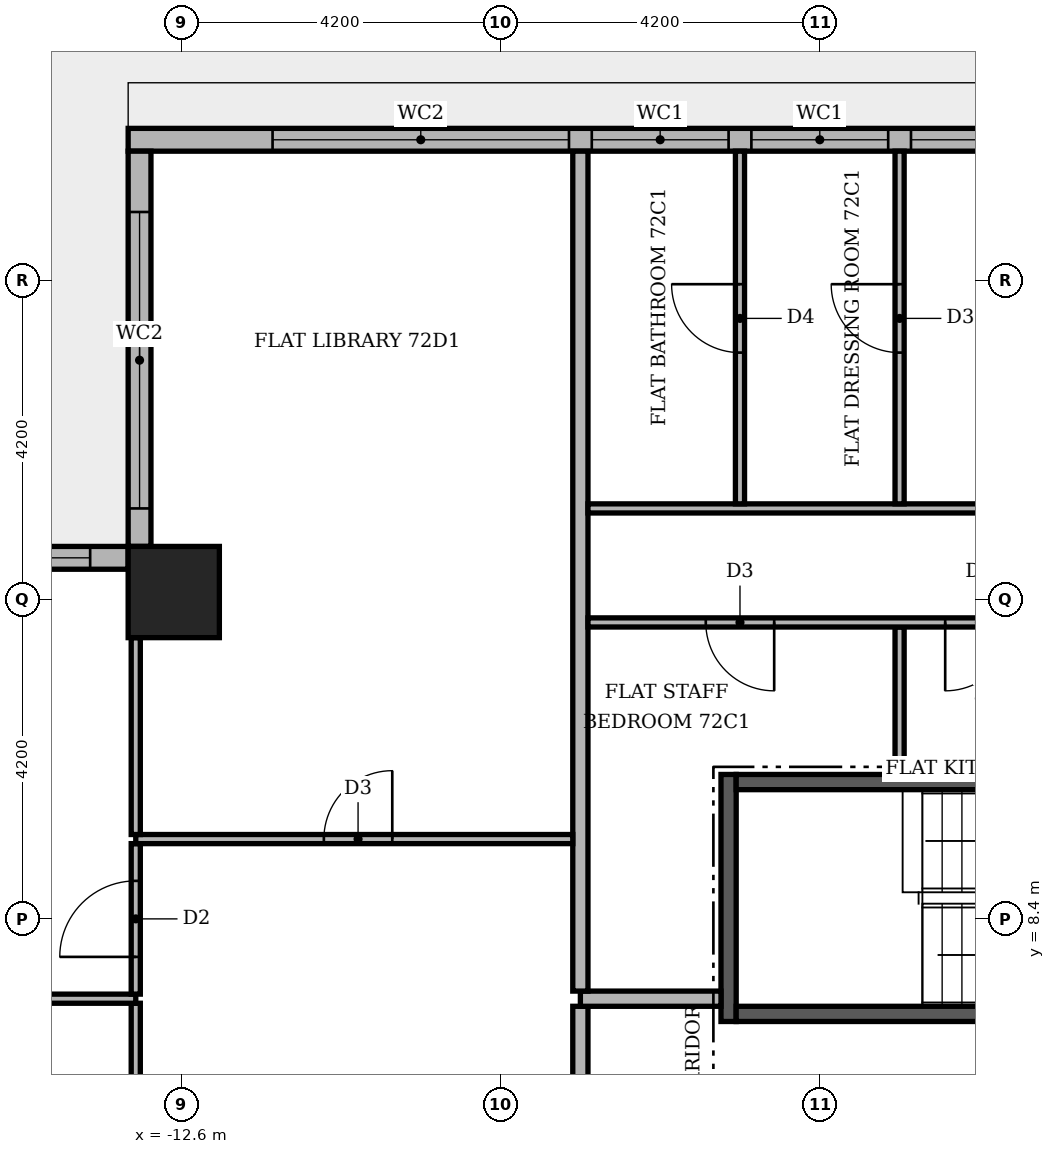
"""IFC4 building model, lengths in metres.
Left out: names, types, materials, properties, quantities, classifications, styles, units other than length and angle.
Written with IfcOpenShell. Run it as: python <this file> out.ifc"""

import sys

from ifc_helpers import new_model, si_unit, direction, frame, frame_2d, origin, origin_2d, place, context, subcontext, project, spatial, rectangle, extrude, element, fill, save


model = new_model("IFC4")
c1 = context("Model", 3, precision=1e-05, world=origin(), true_north=direction((0.0, 1.0)))
c2 = subcontext(c1, "Body", "Model", "MODEL_VIEW")
j1 = project(units=[si_unit("LENGTHUNIT", "METRE"), si_unit("PLANEANGLEUNIT", "RADIAN")], contexts=[c1])
p1 = place(None, origin())
s1 = spatial("IfcSite", under=j1, at=p1, CompositionType="ELEMENT")
p2 = place(p1, origin())
s2 = spatial("IfcBuilding", under=s1, at=p2, CompositionType="ELEMENT")
p3 = place(p2, frame((0.0, 0.0, 300.6)))
s3 = spatial("IfcBuildingStorey", under=s2, at=p3, CompositionType="ELEMENT", Elevation=300.6)
p4 = place(p3, frame((-5.4, 7.05, 0.0), z_axis=(0.0, 0.0, 1.0), x_axis=(0.0, 1.0, 0.0)))
e1 = element("IfcWall", 1, at=p4, inside=s3, PredefinedType="SHEAR", context=c2, shape_type="SweptSolid", body=[
    extrude(rectangle(XDim=3.25, YDim=0.2, at=frame_2d((1.625, 0.0))), origin(), (0.0, 0.0, 1.0), 3.55),
])
p5 = place(p3, frame((-5.3, 7.15, 0.0), z_axis=(0.0, 0.0, 1.0), x_axis=(1.0, 0.0, 0.0)))
e2 = element("IfcWall", 2, at=p5, inside=s3, PredefinedType="SHEAR", context=c2, shape_type="SweptSolid", body=[
    extrude(rectangle(XDim=6.4, YDim=0.2, at=frame_2d((3.2, 0.0))), origin(), (0.0, 0.0, 1.0), 3.55),
])
p6 = place(p5, frame((5.25, 0.0, 0.0)))
e3 = element("IfcOpeningElement", 3, at=p6, cuts=e2, PredefinedType="OPENING", context=c2, shape_type="SweptSolid", body=[
    extrude(rectangle(XDim=1.0, YDim=2.1, at=frame_2d((0.5, 1.05))), frame((0.0, 0.11, 0.0), z_axis=(0.0, -1.0, 0.0), x_axis=(1.0, 0.0, 0.0)), (0.0, 0.0, 1.0), 0.22),
])
p7 = place(p3, frame((-5.3, 10.2, 0.0), z_axis=(0.0, 0.0, 1.0), x_axis=(1.0, 0.0, 0.0)))
e4 = element("IfcWall", 4, at=p7, inside=s3, PredefinedType="SHEAR", context=c2, shape_type="SweptSolid", body=[
    extrude(rectangle(XDim=6.4, YDim=0.2, at=frame_2d((3.2, 0.0))), origin(), (0.0, 0.0, 1.0), 3.55),
])
p8 = place(p3, frame((-12.7, 12.7, -0.35), z_axis=(0.0, 0.0, 1.0), x_axis=(1.0, 0.0, 0.0)))
e5 = element("IfcColumn", 5, at=p8, inside=s3, PredefinedType="COLUMN", context=c2, shape_type="SweptSolid", body=[
    extrude(rectangle(XDim=1.2, YDim=1.2, at=origin_2d()), origin(), (0.0, 0.0, 1.0), 4.25),
])
p9 = place(p3, frame((13.0, 18.65, 0.0), z_axis=(0.0, 0.0, 1.0), x_axis=(-1.0, 0.0, 0.0)))
e6 = element("IfcWall", 6, at=p9, inside=s3, PredefinedType="STANDARD", context=c2, shape_type="SweptSolid", body=[
    extrude(rectangle(XDim=26.3, YDim=0.3, at=frame_2d((13.15, 0.0))), origin(), (0.0, 0.0, 1.0), 3.55),
])
p10 = place(p9, frame((1.6, 0.0, 0.6)))
e7 = element("IfcOpeningElement", 7, at=p10, cuts=e6, PredefinedType="OPENING", context=c2, shape_type="SweptSolid", body=[
    extrude(rectangle(XDim=1.8, YDim=2.4, at=frame_2d((0.9, 1.2))), frame((0.0, 0.16, 0.0), z_axis=(0.0, -1.0, 0.0), x_axis=(1.0, 0.0, 0.0)), (0.0, 0.0, 1.0), 0.32),
])
p11 = place(p9, frame((3.7, 0.0, 0.0)))
e8 = element("IfcOpeningElement", 8, at=p11, cuts=e6, PredefinedType="OPENING", context=c2, shape_type="SweptSolid", body=[
    extrude(rectangle(XDim=3.9, YDim=2.4, at=frame_2d((1.95, 1.2))), frame((0.0, 0.16, 0.0), z_axis=(0.0, -1.0, 0.0), x_axis=(1.0, 0.0, 0.0)), (0.0, 0.0, 1.0), 0.32),
])
p12 = place(p9, frame((7.9, 0.0, 0.6)))
e9 = element("IfcOpeningElement", 9, at=p12, cuts=e6, PredefinedType="OPENING", context=c2, shape_type="SweptSolid", body=[
    extrude(rectangle(XDim=1.8, YDim=2.4, at=frame_2d((0.9, 1.2))), frame((0.0, 0.16, 0.0), z_axis=(0.0, -1.0, 0.0), x_axis=(1.0, 0.0, 0.0)), (0.0, 0.0, 1.0), 0.32),
])
p13 = place(p9, frame((10.0, 0.0, 0.0)))
e10 = element("IfcOpeningElement", 10, at=p13, cuts=e6, PredefinedType="OPENING", context=c2, shape_type="SweptSolid", body=[
    extrude(rectangle(XDim=1.8, YDim=2.4, at=frame_2d((0.9, 1.2))), frame((0.0, 0.16, 0.0), z_axis=(0.0, -1.0, 0.0), x_axis=(1.0, 0.0, 0.0)), (0.0, 0.0, 1.0), 0.32),
])
p14 = place(p9, frame((12.1, 0.0, 0.6)))
e11 = element("IfcOpeningElement", 11, at=p14, cuts=e6, PredefinedType="OPENING", context=c2, shape_type="SweptSolid", body=[
    extrude(rectangle(XDim=3.9, YDim=2.4, at=frame_2d((1.95, 1.2))), frame((0.0, 0.16, 0.0), z_axis=(0.0, -1.0, 0.0), x_axis=(1.0, 0.0, 0.0)), (0.0, 0.0, 1.0), 0.32),
])
p15 = place(p9, frame((16.3, 0.0, 0.6)))
e12 = element("IfcOpeningElement", 12, at=p15, cuts=e6, PredefinedType="OPENING", context=c2, shape_type="SweptSolid", body=[
    extrude(rectangle(XDim=1.8, YDim=2.4, at=frame_2d((0.9, 1.2))), frame((0.0, 0.16, 0.0), z_axis=(0.0, -1.0, 0.0), x_axis=(1.0, 0.0, 0.0)), (0.0, 0.0, 1.0), 0.32),
])
p16 = place(p9, frame((18.4, 0.0, 0.6)))
e13 = element("IfcOpeningElement", 13, at=p16, cuts=e6, PredefinedType="OPENING", context=c2, shape_type="SweptSolid", body=[
    extrude(rectangle(XDim=1.8, YDim=2.4, at=frame_2d((0.9, 1.2))), frame((0.0, 0.16, 0.0), z_axis=(0.0, -1.0, 0.0), x_axis=(1.0, 0.0, 0.0)), (0.0, 0.0, 1.0), 0.32),
])
p17 = place(p9, frame((20.5, 0.0, 0.6)))
e14 = element("IfcOpeningElement", 14, at=p17, cuts=e6, PredefinedType="OPENING", context=c2, shape_type="SweptSolid", body=[
    extrude(rectangle(XDim=3.9, YDim=2.4, at=frame_2d((1.95, 1.2))), frame((0.0, 0.16, 0.0), z_axis=(0.0, -1.0, 0.0), x_axis=(1.0, 0.0, 0.0)), (0.0, 0.0, 1.0), 0.32),
])
p18 = place(p3, frame((-13.15, 18.5, 0.0), z_axis=(0.0, 0.0, 1.0), x_axis=(0.0, -1.0, 0.0)))
e15 = element("IfcWall", 15, at=p18, inside=s3, PredefinedType="STANDARD", context=c2, shape_type="SweptSolid", body=[
    extrude(rectangle(XDim=5.2, YDim=0.3, at=frame_2d((2.6, 0.0))), origin(), (0.0, 0.0, 1.0), 3.55),
])
p19 = place(p18, frame((0.8, 0.0, 0.6)))
e16 = element("IfcOpeningElement", 16, at=p19, cuts=e15, PredefinedType="OPENING", context=c2, shape_type="SweptSolid", body=[
    extrude(rectangle(XDim=3.9, YDim=2.4, at=frame_2d((1.95, 1.2))), frame((0.0, 0.16, 0.0), z_axis=(0.0, -1.0, 0.0), x_axis=(1.0, 0.0, 0.0)), (0.0, 0.0, 1.0), 0.32),
])
p20 = place(p3, frame((-13.3, 13.15, 0.0), z_axis=(0.0, 0.0, 1.0), x_axis=(-1.0, 0.0, 0.0)))
e17 = element("IfcWall", 17, at=p20, inside=s3, PredefinedType="STANDARD", context=c2, shape_type="SweptSolid", body=[
    extrude(rectangle(XDim=5.5, YDim=0.3, at=frame_2d((2.75, 0.0))), origin(), (0.0, 0.0, 1.0), 3.55),
])
p21 = place(p20, frame((0.5, 0.0, 0.6)))
e18 = element("IfcOpeningElement", 18, at=p21, cuts=e17, PredefinedType="OPENING", context=c2, shape_type="SweptSolid", body=[
    extrude(rectangle(XDim=1.8, YDim=2.4, at=frame_2d((0.9, 1.2))), frame((0.0, 0.16, 0.0), z_axis=(0.0, -1.0, 0.0), x_axis=(1.0, 0.0, 0.0)), (0.0, 0.0, 1.0), 0.32),
])
p22 = place(p20, frame((2.6, 0.0, 0.0)))
e19 = element("IfcOpeningElement", 19, at=p22, cuts=e17, PredefinedType="OPENING", context=c2, shape_type="SweptSolid", body=[
    extrude(rectangle(XDim=1.8, YDim=2.4, at=frame_2d((0.9, 1.2))), frame((0.0, 0.16, 0.0), z_axis=(0.0, -1.0, 0.0), x_axis=(1.0, 0.0, 0.0)), (0.0, 0.0, 1.0), 0.32),
])
p23 = place(p3, frame((-7.35, -7.25, 0.0), z_axis=(0.0, 0.0, 1.0), x_axis=(0.0, 1.0, 0.0)))
e20 = element("IfcWall", 20, at=p23, inside=s3, PredefinedType="PARTITIONING", context=c2, shape_type="SweptSolid", body=[
    extrude(rectangle(XDim=14.5, YDim=0.2, at=frame_2d((7.25, 0.0))), origin(), (0.0, 0.0, 1.0), 3.55),
])
p24 = place(p23, frame((11.95, 0.0, 0.0)))
e21 = element("IfcOpeningElement", 21, at=p24, cuts=e20, PredefinedType="OPENING", context=c2, shape_type="SweptSolid", body=[
    extrude(rectangle(XDim=1.1, YDim=2.4, at=frame_2d((0.55, 1.2))), frame((0.0, 0.11, 0.0), z_axis=(0.0, -1.0, 0.0), x_axis=(1.0, 0.0, 0.0)), (0.0, 0.0, 1.0), 0.22),
])
p25 = place(p3, frame((-13.2, 3.21, 0.0), z_axis=(0.0, 0.0, 1.0), x_axis=(0.0, 1.0, 0.0)))
e22 = element("IfcWall", 22, at=p25, inside=s3, PredefinedType="PARTITIONING", context=c2, shape_type="SweptSolid", body=[
    extrude(rectangle(XDim=4.08, YDim=0.12, at=frame_2d((2.04, 0.0))), origin(), (0.0, 0.0, 1.0), 3.55),
])
p26 = place(p25, frame((1.59, 0.0, 0.0)))
e23 = element("IfcOpeningElement", 23, at=p26, cuts=e22, PredefinedType="OPENING", context=c2, shape_type="SweptSolid", body=[
    extrude(rectangle(XDim=0.9, YDim=2.1, at=frame_2d((0.45, 1.05))), frame((0.0, 0.07, 0.0), z_axis=(0.0, -1.0, 0.0), x_axis=(1.0, 0.0, 0.0)), (0.0, 0.0, 1.0), 0.14),
])
p27 = place(p3, frame((-18.5, 7.35, 0.0), z_axis=(0.0, 0.0, 1.0), x_axis=(1.0, 0.0, 0.0)))
e24 = element("IfcWall", 24, at=p27, inside=s3, PredefinedType="PARTITIONING", context=c2, shape_type="SweptSolid", body=[
    extrude(rectangle(XDim=5.3, YDim=0.12, at=frame_2d((2.65, 0.0))), origin(), (0.0, 0.0, 1.0), 3.55),
])
p28 = place(p3, frame((-7.35, 7.35, 0.0), z_axis=(0.0, 0.0, 1.0), x_axis=(1.0, 0.0, 0.0)))
e25 = element("IfcWall", 25, at=p28, inside=s3, PredefinedType="PARTITIONING", context=c2, shape_type="SweptSolid", body=[
    extrude(rectangle(XDim=1.85, YDim=0.2, at=frame_2d((0.925, 0.0))), origin(), (0.0, 0.0, 1.0), 3.55),
])
p29 = place(p3, frame((-13.2, 7.41, 0.0), z_axis=(0.0, 0.0, 1.0), x_axis=(0.0, 1.0, 0.0)))
e26 = element("IfcWall", 26, at=p29, inside=s3, PredefinedType="PARTITIONING", context=c2, shape_type="SweptSolid", body=[
    extrude(rectangle(XDim=1.98, YDim=0.12, at=frame_2d((0.99, 0.0))), origin(), (0.0, 0.0, 1.0), 3.55),
])
p30 = place(p29, frame((0.49, 0.0, 0.0)))
e27 = element("IfcOpeningElement", 27, at=p30, cuts=e26, PredefinedType="OPENING", context=c2, shape_type="SweptSolid", body=[
    extrude(rectangle(XDim=1.0, YDim=2.1, at=frame_2d((0.5, 1.05))), frame((0.0, 0.07, 0.0), z_axis=(0.0, -1.0, 0.0), x_axis=(1.0, 0.0, 0.0)), (0.0, 0.0, 1.0), 0.14),
])
p31 = place(p3, frame((-7.35, 7.45, 0.0), z_axis=(0.0, 0.0, 1.0), x_axis=(0.0, 1.0, 0.0)))
e28 = element("IfcWall", 28, at=p31, inside=s3, PredefinedType="PARTITIONING", context=c2, shape_type="SweptSolid", body=[
    extrude(rectangle(XDim=11.05, YDim=0.2, at=frame_2d((5.525, 0.0))), origin(), (0.0, 0.0, 1.0), 3.55),
])
p32 = place(p3, frame((-13.2, 9.45, 0.0), z_axis=(0.0, 0.0, 1.0), x_axis=(1.0, 0.0, 0.0)))
e29 = element("IfcWall", 29, at=p32, inside=s3, PredefinedType="PARTITIONING", context=c2, shape_type="SweptSolid", body=[
    extrude(rectangle(XDim=5.75, YDim=0.12, at=frame_2d((2.875, 0.0))), origin(), (0.0, 0.0, 1.0), 3.55),
])
p33 = place(p32, frame((2.475, 0.0, 0.0)))
e30 = element("IfcOpeningElement", 30, at=p33, cuts=e29, PredefinedType="OPENING", context=c2, shape_type="SweptSolid", body=[
    extrude(rectangle(XDim=0.9, YDim=2.1, at=frame_2d((0.45, 1.05))), frame((0.0, 0.07, 0.0), z_axis=(0.0, -1.0, 0.0), x_axis=(1.0, 0.0, 0.0)), (0.0, 0.0, 1.0), 0.14),
])
p34 = place(p3, frame((-13.2, 9.51, 0.0), z_axis=(0.0, 0.0, 1.0), x_axis=(0.0, 1.0, 0.0)))
e31 = element("IfcWall", 31, at=p34, inside=s3, PredefinedType="PARTITIONING", context=c2, shape_type="SweptSolid", body=[
    extrude(rectangle(XDim=2.59, YDim=0.12, at=frame_2d((1.295, 0.0))), origin(), (0.0, 0.0, 1.0), 3.55),
])
p35 = place(p3, frame((-3.15, 10.3, 0.0), z_axis=(0.0, 0.0, 1.0), x_axis=(0.0, 1.0, 0.0)))
e32 = element("IfcWall", 32, at=p35, inside=s3, PredefinedType="PARTITIONING", context=c2, shape_type="SweptSolid", body=[
    extrude(rectangle(XDim=1.94, YDim=0.12, at=frame_2d((0.97, 0.0))), origin(), (0.0, 0.0, 1.0), 3.55),
])
p36 = place(p3, frame((-7.25, 12.3, 0.0), z_axis=(0.0, 0.0, 1.0), x_axis=(1.0, 0.0, 0.0)))
e33 = element("IfcWall", 33, at=p36, inside=s3, PredefinedType="PARTITIONING", context=c2, shape_type="SweptSolid", body=[
    extrude(rectangle(XDim=8.3, YDim=0.12, at=frame_2d((4.15, 0.0))), origin(), (0.0, 0.0, 1.0), 3.55),
])
p37 = place(p36, frame((6.8, 0.0, 0.0)))
e34 = element("IfcOpeningElement", 34, at=p37, cuts=e33, PredefinedType="OPENING", context=c2, shape_type="SweptSolid", body=[
    extrude(rectangle(XDim=0.9, YDim=2.1, at=frame_2d((0.45, 1.05))), frame((0.0, 0.07, 0.0), z_axis=(0.0, -1.0, 0.0), x_axis=(1.0, 0.0, 0.0)), (0.0, 0.0, 1.0), 0.14),
])
p38 = place(p36, frame((4.7, 0.0, 0.0)))
e35 = element("IfcOpeningElement", 35, at=p38, cuts=e33, PredefinedType="OPENING", context=c2, shape_type="SweptSolid", body=[
    extrude(rectangle(XDim=0.9, YDim=2.1, at=frame_2d((0.45, 1.05))), frame((0.0, 0.07, 0.0), z_axis=(0.0, -1.0, 0.0), x_axis=(1.0, 0.0, 0.0)), (0.0, 0.0, 1.0), 0.14),
])
p39 = place(p36, frame((1.55, 0.0, 0.0)))
e36 = element("IfcOpeningElement", 36, at=p39, cuts=e33, PredefinedType="OPENING", context=c2, shape_type="SweptSolid", body=[
    extrude(rectangle(XDim=0.9, YDim=2.1, at=frame_2d((0.45, 1.05))), frame((0.0, 0.07, 0.0), z_axis=(0.0, -1.0, 0.0), x_axis=(1.0, 0.0, 0.0)), (0.0, 0.0, 1.0), 0.14),
])
p40 = place(p3, frame((-7.25, 13.8, 0.0), z_axis=(0.0, 0.0, 1.0), x_axis=(1.0, 0.0, 0.0)))
e37 = element("IfcWall", 37, at=p40, inside=s3, PredefinedType="PARTITIONING", context=c2, shape_type="SweptSolid", body=[
    extrude(rectangle(XDim=19.349, YDim=0.12, at=frame_2d((9.675, 0.0))), origin(), (0.0, 0.0, 1.0), 3.55),
])
p41 = place(p40, frame((13.05, 0.0, 0.0)))
e38 = element("IfcOpeningElement", 38, at=p41, cuts=e37, PredefinedType="OPENING", context=c2, shape_type="SweptSolid", body=[
    extrude(rectangle(XDim=1.0, YDim=2.1, at=frame_2d((0.5, 1.05))), frame((0.0, 0.07, 0.0), z_axis=(0.0, -1.0, 0.0), x_axis=(1.0, 0.0, 0.0)), (0.0, 0.0, 1.0), 0.14),
])
p42 = place(p40, frame((7.85, 0.0, 0.0)))
e39 = element("IfcOpeningElement", 39, at=p42, cuts=e37, PredefinedType="OPENING", context=c2, shape_type="SweptSolid", body=[
    extrude(rectangle(XDim=0.9, YDim=2.1, at=frame_2d((0.45, 1.05))), frame((0.0, 0.07, 0.0), z_axis=(0.0, -1.0, 0.0), x_axis=(1.0, 0.0, 0.0)), (0.0, 0.0, 1.0), 0.14),
])
p43 = place(p3, frame((-5.25, 13.86, 0.0), z_axis=(0.0, 0.0, 1.0), x_axis=(0.0, 1.0, 0.0)))
e40 = element("IfcWall", 40, at=p43, inside=s3, PredefinedType="PARTITIONING", context=c2, shape_type="SweptSolid", body=[
    extrude(rectangle(XDim=4.64, YDim=0.12, at=frame_2d((2.32, 0.0))), origin(), (0.0, 0.0, 1.0), 3.55),
])
p44 = place(p43, frame((1.99, 0.0, 0.0)))
e41 = element("IfcOpeningElement", 41, at=p44, cuts=e40, PredefinedType="OPENING", context=c2, shape_type="SweptSolid", body=[
    extrude(rectangle(XDim=0.9, YDim=2.1, at=frame_2d((0.45, 1.05))), frame((0.0, 0.07, 0.0), z_axis=(0.0, -1.0, 0.0), x_axis=(1.0, 0.0, 0.0)), (0.0, 0.0, 1.0), 0.14),
])
p45 = place(p3, frame((-3.15, 13.86, 0.0), z_axis=(0.0, 0.0, 1.0), x_axis=(0.0, 1.0, 0.0)))
e42 = element("IfcWall", 42, at=p45, inside=s3, PredefinedType="PARTITIONING", context=c2, shape_type="SweptSolid", body=[
    extrude(rectangle(XDim=4.64, YDim=0.12, at=frame_2d((2.32, 0.0))), origin(), (0.0, 0.0, 1.0), 3.55),
])
p46 = place(p45, frame((1.99, 0.0, 0.0)))
e43 = element("IfcOpeningElement", 43, at=p46, cuts=e42, PredefinedType="OPENING", context=c2, shape_type="SweptSolid", body=[
    extrude(rectangle(XDim=0.9, YDim=2.1, at=frame_2d((0.45, 1.05))), frame((0.0, 0.07, 0.0), z_axis=(0.0, -1.0, 0.0), x_axis=(1.0, 0.0, 0.0)), (0.0, 0.0, 1.0), 0.14),
])
p47 = place(p14, origin())
e44 = element("IfcWindow", 44, at=p47, inside=s3, PartitioningType="SINGLE_PANEL", PredefinedType="WINDOW", context=c2, shape_type="SweptSolid", body=[
    extrude(rectangle(XDim=3.9, YDim=2.4, at=frame_2d((1.95, 1.2))), frame((0.0, 0.03, 0.0), z_axis=(0.0, -1.0, 0.0), x_axis=(1.0, 0.0, 0.0)), (0.0, 0.0, 1.0), 0.06),
])
fill(e11, e44)
p48 = place(p15, origin())
e45 = element("IfcWindow", 45, at=p48, inside=s3, PartitioningType="SINGLE_PANEL", PredefinedType="WINDOW", context=c2, shape_type="SweptSolid", body=[
    extrude(rectangle(XDim=1.8, YDim=2.4, at=frame_2d((0.9, 1.2))), frame((0.0, 0.03, 0.0), z_axis=(0.0, -1.0, 0.0), x_axis=(1.0, 0.0, 0.0)), (0.0, 0.0, 1.0), 0.06),
])
fill(e12, e45)
p49 = place(p16, origin())
e46 = element("IfcWindow", 46, at=p49, inside=s3, PartitioningType="SINGLE_PANEL", PredefinedType="WINDOW", context=c2, shape_type="SweptSolid", body=[
    extrude(rectangle(XDim=1.8, YDim=2.4, at=frame_2d((0.9, 1.2))), frame((0.0, 0.03, 0.0), z_axis=(0.0, -1.0, 0.0), x_axis=(1.0, 0.0, 0.0)), (0.0, 0.0, 1.0), 0.06),
])
fill(e13, e46)
p50 = place(p17, origin())
e47 = element("IfcWindow", 47, at=p50, inside=s3, PartitioningType="SINGLE_PANEL", PredefinedType="WINDOW", context=c2, shape_type="SweptSolid", body=[
    extrude(rectangle(XDim=3.9, YDim=2.4, at=frame_2d((1.95, 1.2))), frame((0.0, 0.03, 0.0), z_axis=(0.0, -1.0, 0.0), x_axis=(1.0, 0.0, 0.0)), (0.0, 0.0, 1.0), 0.06),
])
fill(e14, e47)
p51 = place(p19, origin())
e48 = element("IfcWindow", 48, at=p51, inside=s3, PartitioningType="SINGLE_PANEL", PredefinedType="WINDOW", context=c2, shape_type="SweptSolid", body=[
    extrude(rectangle(XDim=3.9, YDim=2.4, at=frame_2d((1.95, 1.2))), frame((0.0, 0.03, 0.0), z_axis=(0.0, -1.0, 0.0), x_axis=(1.0, 0.0, 0.0)), (0.0, 0.0, 1.0), 0.06),
])
fill(e16, e48)
p52 = place(p21, origin())
e49 = element("IfcWindow", 49, at=p52, inside=s3, PartitioningType="SINGLE_PANEL", PredefinedType="WINDOW", context=c2, shape_type="SweptSolid", body=[
    extrude(rectangle(XDim=1.8, YDim=2.4, at=frame_2d((0.9, 1.2))), frame((0.0, 0.03, 0.0), z_axis=(0.0, -1.0, 0.0), x_axis=(1.0, 0.0, 0.0)), (0.0, 0.0, 1.0), 0.06),
])
fill(e18, e49)
p53 = place(p38, frame((0.9, 0.0, 0.0), z_axis=(0.0, 0.0, 1.0), x_axis=(-1.0, 0.0, 0.0)))
e50 = element("IfcDoor", 50, at=p53, inside=s3, OperationType="SINGLE_SWING_LEFT", PredefinedType="DOOR", context=c2, shape_type="SweptSolid", body=[
    extrude(rectangle(XDim=0.9, YDim=2.1, at=frame_2d((0.45, 1.05))), frame((0.0, 0.025, 0.0), z_axis=(0.0, -1.0, 0.0), x_axis=(1.0, 0.0, 0.0)), (0.0, 0.0, 1.0), 0.05),
])
fill(e35, e50)
p54 = place(p39, frame((0.9, 0.0, 0.0), z_axis=(0.0, 0.0, 1.0), x_axis=(-1.0, 0.0, 0.0)))
e51 = element("IfcDoor", 51, at=p54, inside=s3, OperationType="SINGLE_SWING_RIGHT", PredefinedType="DOOR", context=c2, shape_type="SweptSolid", body=[
    extrude(rectangle(XDim=0.9, YDim=2.1, at=frame_2d((0.45, 1.05))), frame((0.0, 0.025, 0.0), z_axis=(0.0, -1.0, 0.0), x_axis=(1.0, 0.0, 0.0)), (0.0, 0.0, 1.0), 0.05),
])
fill(e36, e51)
p55 = place(p46, origin())
e52 = element("IfcDoor", 52, at=p55, inside=s3, OperationType="SINGLE_SWING_RIGHT", PredefinedType="DOOR", context=c2, shape_type="SweptSolid", body=[
    extrude(rectangle(XDim=0.9, YDim=2.1, at=frame_2d((0.45, 1.05))), frame((0.0, 0.025, 0.0), z_axis=(0.0, -1.0, 0.0), x_axis=(1.0, 0.0, 0.0)), (0.0, 0.0, 1.0), 0.05),
])
fill(e43, e52)
p56 = place(p44, origin())
e53 = element("IfcDoor", 53, at=p56, inside=s3, OperationType="SINGLE_SWING_RIGHT", PredefinedType="DOOR", context=c2, shape_type="SweptSolid", body=[
    extrude(rectangle(XDim=0.9, YDim=2.1, at=frame_2d((0.45, 1.05))), frame((0.0, 0.025, 0.0), z_axis=(0.0, -1.0, 0.0), x_axis=(1.0, 0.0, 0.0)), (0.0, 0.0, 1.0), 0.05),
])
fill(e41, e53)
p57 = place(p33, origin())
e54 = element("IfcDoor", 54, at=p57, inside=s3, OperationType="SINGLE_SWING_RIGHT", PredefinedType="DOOR", context=c2, shape_type="SweptSolid", body=[
    extrude(rectangle(XDim=0.9, YDim=2.1, at=frame_2d((0.45, 1.05))), frame((0.0, 0.025, 0.0), z_axis=(0.0, -1.0, 0.0), x_axis=(1.0, 0.0, 0.0)), (0.0, 0.0, 1.0), 0.05),
])
fill(e30, e54)
p58 = place(p30, origin())
e55 = element("IfcDoor", 55, at=p58, inside=s3, OperationType="SINGLE_SWING_LEFT", PredefinedType="DOOR", context=c2, shape_type="SweptSolid", body=[
    extrude(rectangle(XDim=1.0, YDim=2.1, at=frame_2d((0.5, 1.05))), frame((0.0, 0.025, 0.0), z_axis=(0.0, -1.0, 0.0), x_axis=(1.0, 0.0, 0.0)), (0.0, 0.0, 1.0), 0.05),
])
fill(e27, e55)
save(model, sys.argv[1])
